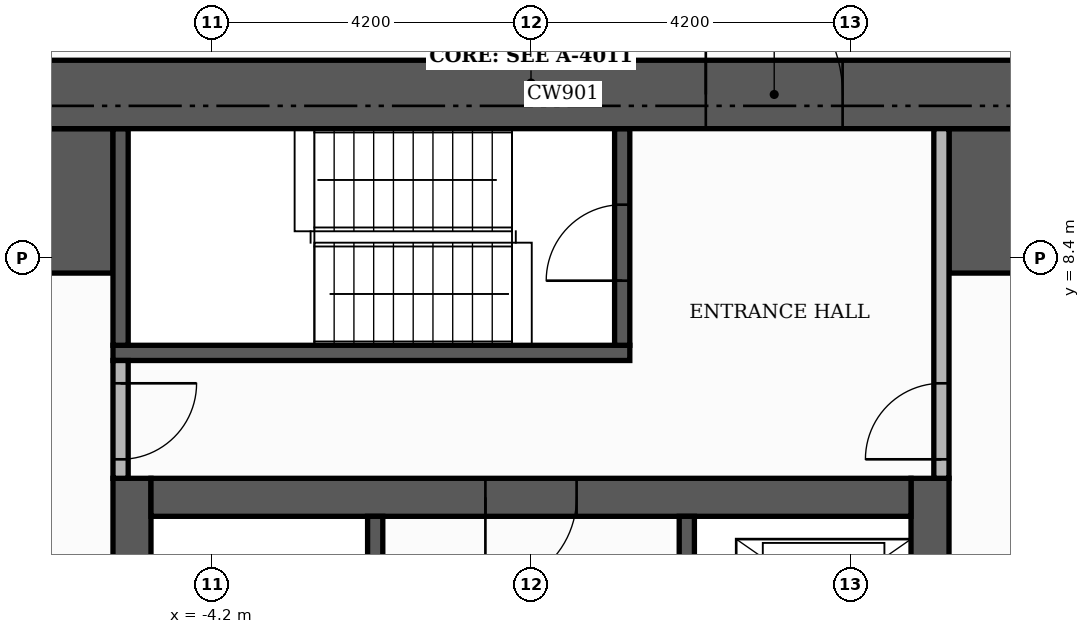
"""IFC4 building model, lengths in metres.
Left out: names, types, materials, properties, quantities, classifications, styles, units other than length and angle.
Written with IfcOpenShell. Run it as: python <this file> out.ifc"""

import sys

from ifc_helpers import new_model, si_unit, direction, frame, frame_2d, origin, place, context, subcontext, project, spatial, rectangle, extrude, element, fill, save


model = new_model("IFC4")
c1 = context("Model", 3, precision=1e-05, world=origin(), true_north=direction((0.0, 1.0)))
c2 = subcontext(c1, "Body", "Model", "MODEL_VIEW")
j1 = project(units=[si_unit("LENGTHUNIT", "METRE"), si_unit("PLANEANGLEUNIT", "RADIAN")], contexts=[c1])
p1 = place(None, origin())
s1 = spatial("IfcSite", under=j1, at=p1, CompositionType="ELEMENT")
p2 = place(p1, origin())
s2 = spatial("IfcBuilding", under=s1, at=p2, CompositionType="ELEMENT")
p3 = place(p2, frame((0.0, 0.0, 69.9)))
s3 = spatial("IfcBuildingStorey", under=s2, at=p3, CompositionType="ELEMENT", Elevation=69.9)
for number, where, z_axis, x_axis in (
    (1, (-5.25, -5.0, 0.0), (0.0, 0.0, 1.0), (0.0, 1.0, 0.0)),
    (2, (5.25, -5.0, 0.0), (0.0, 0.0, 1.0), (0.0, 1.0, 0.0)),
):
    element("IfcWall", number, at=place(p3, frame(where, z_axis=z_axis, x_axis=x_axis)), inside=s3, PredefinedType="SHEAR", context=c2, shape_type="SweptSolid", body=[
        extrude(rectangle(XDim=10.5, YDim=0.5, at=frame_2d((5.25, 0.0))), origin(), (0.0, 0.0, 1.0), 3.4),
    ])
p4 = place(p3, frame((-5.0, 5.25, 0.0), z_axis=(0.0, 0.0, 1.0), x_axis=(1.0, 0.0, 0.0)))
e3 = element("IfcWall", 3, at=p4, inside=s3, PredefinedType="SHEAR", context=c2, shape_type="SweptSolid", body=[
    extrude(rectangle(XDim=10.0, YDim=0.5, at=frame_2d((5.0, 0.0))), origin(), (0.0, 0.0, 1.0), 3.4),
])
p5 = place(p4, frame((4.4, 0.0, 0.0)))
e4 = element("IfcOpeningElement", 4, at=p5, cuts=e3, PredefinedType="OPENING", context=c2, shape_type="SweptSolid", body=[
    extrude(rectangle(XDim=1.2, YDim=2.1, at=frame_2d((0.6, 1.05))), frame((0.0, 0.26, 0.0), z_axis=(0.0, -1.0, 0.0), x_axis=(1.0, 0.0, 0.0)), (0.0, 0.0, 1.0), 0.52),
])
for number, where, z_axis, x_axis in (
    (5, (-10.1, 9.15, 0.0), (0.0, 0.0, 1.0), (1.0, 0.0, 0.0)),
    (6, (5.5, 9.15, 0.0), (0.0, 0.0, 1.0), (1.0, 0.0, 0.0)),
):
    element("IfcWall", number, at=place(p3, frame(where, z_axis=z_axis, x_axis=x_axis)), inside=s3, PredefinedType="SHEAR", context=c2, shape_type="SweptSolid", body=[
        extrude(rectangle(XDim=4.6, YDim=1.9, at=frame_2d((2.3, 0.0))), origin(), (0.0, 0.0, 1.0), 3.4),
    ])
p6 = place(p3, frame((-2.05, -1.4, 0.0), z_axis=(0.0, 0.0, 1.0), x_axis=(0.0, 1.0, 0.0)))
e7 = element("IfcWall", 7, at=p6, inside=s3, PredefinedType="SHEAR", context=c2, shape_type="SweptSolid", body=[
    extrude(rectangle(XDim=6.4, YDim=0.2, at=frame_2d((3.2, 0.0))), origin(), (0.0, 0.0, 1.0), 3.4),
])
p7 = place(p6, frame((0.15, 0.0, 0.0)))
e8 = element("IfcOpeningElement", 8, at=p7, cuts=e7, PredefinedType="OPENING", context=c2, shape_type="SweptSolid", body=[
    extrude(rectangle(XDim=1.0, YDim=2.1, at=frame_2d((0.5, 1.05))), frame((0.0, 0.11, 0.0), z_axis=(0.0, -1.0, 0.0), x_axis=(1.0, 0.0, 0.0)), (0.0, 0.0, 1.0), 0.22),
])
p8 = place(p3, frame((-5.5, 7.15, 0.0), z_axis=(0.0, 0.0, 1.0), x_axis=(1.0, 0.0, 0.0)))
e9 = element("IfcWall", 9, at=p8, inside=s3, PredefinedType="SHEAR", context=c2, shape_type="SweptSolid", body=[
    extrude(rectangle(XDim=6.8, YDim=0.2, at=frame_2d((3.4, 0.0))), origin(), (0.0, 0.0, 1.0), 3.4),
])
p9 = place(p3, frame((-5.4, 7.25, 0.0), z_axis=(0.0, 0.0, 1.0), x_axis=(0.0, 1.0, 0.0)))
e10 = element("IfcWall", 10, at=p9, inside=s3, PredefinedType="SHEAR", context=c2, shape_type="SweptSolid", body=[
    extrude(rectangle(XDim=2.85, YDim=0.2, at=frame_2d((1.425, 0.0))), origin(), (0.0, 0.0, 1.0), 3.4),
])
p10 = place(p3, frame((1.2, 7.25, 0.0), z_axis=(0.0, 0.0, 1.0), x_axis=(0.0, 1.0, 0.0)))
e11 = element("IfcWall", 11, at=p10, inside=s3, PredefinedType="SHEAR", context=c2, shape_type="SweptSolid", body=[
    extrude(rectangle(XDim=2.85, YDim=0.2, at=frame_2d((1.425, 0.0))), origin(), (0.0, 0.0, 1.0), 3.4),
])
p11 = place(p10, frame((0.85, 0.0, 0.0)))
e12 = element("IfcOpeningElement", 12, at=p11, cuts=e11, PredefinedType="OPENING", context=c2, shape_type="SweptSolid", body=[
    extrude(rectangle(XDim=1.0, YDim=2.1, at=frame_2d((0.5, 1.05))), frame((0.0, 0.11, 0.0), z_axis=(0.0, -1.0, 0.0), x_axis=(1.0, 0.0, 0.0)), (0.0, 0.0, 1.0), 0.22),
])
p12 = place(p3, frame((2.05, 1.6, 0.0), z_axis=(0.0, 0.0, 1.0), x_axis=(0.0, 1.0, 0.0)))
e13 = element("IfcWall", 13, at=p12, inside=s3, PredefinedType="SHEAR", context=c2, shape_type="SweptSolid", body=[
    extrude(rectangle(XDim=3.4, YDim=0.2, at=frame_2d((1.7, 0.0))), origin(), (0.0, 0.0, 1.0), 3.4),
])
p13 = place(p12, frame((1.75, 0.0, 0.0)))
e14 = element("IfcOpeningElement", 14, at=p13, cuts=e13, PredefinedType="OPENING", context=c2, shape_type="SweptSolid", body=[
    extrude(rectangle(XDim=1.1, YDim=2.1, at=frame_2d((0.55, 1.05))), frame((0.0, 0.11, 0.0), z_axis=(0.0, -1.0, 0.0), x_axis=(1.0, 0.0, 0.0)), (0.0, 0.0, 1.0), 0.22),
])
p14 = place(p12, frame((0.15, 0.0, 0.0)))
e15 = element("IfcOpeningElement", 15, at=p14, cuts=e13, PredefinedType="OPENING", context=c2, shape_type="SweptSolid", body=[
    extrude(rectangle(XDim=0.8, YDim=2.1, at=frame_2d((0.4, 1.05))), frame((0.0, 0.11, 0.0), z_axis=(0.0, -1.0, 0.0), x_axis=(1.0, 0.0, 0.0)), (0.0, 0.0, 1.0), 0.22),
])
p15 = place(p3, frame((-11.0, 10.55, 0.0), z_axis=(0.0, 0.0, 1.0), x_axis=(1.0, 0.0, 0.0)))
e16 = element("IfcWall", 16, at=p15, inside=s3, PredefinedType="SHEAR", context=c2, shape_type="SweptSolid", body=[
    extrude(rectangle(XDim=22.0, YDim=0.9, at=frame_2d((11.0, 0.0))), origin(), (0.0, 0.0, 1.0), 3.4),
])
p16 = place(p15, frame((13.3, 0.0, 0.0)))
e17 = element("IfcOpeningElement", 17, at=p16, cuts=e16, PredefinedType="OPENING", context=c2, shape_type="SweptSolid", body=[
    extrude(rectangle(XDim=1.8, YDim=2.2, at=frame_2d((0.9, 1.1))), frame((0.0, 0.46, 0.0), z_axis=(0.0, -1.0, 0.0), x_axis=(1.0, 0.0, 0.0)), (0.0, 0.0, 1.0), 0.92),
])
p17 = place(p3, frame((-5.4, 5.5, 0.0), z_axis=(0.0, 0.0, 1.0), x_axis=(0.0, 1.0, 0.0)))
e18 = element("IfcWall", 18, at=p17, inside=s3, PredefinedType="PARTITIONING", context=c2, shape_type="SweptSolid", body=[
    extrude(rectangle(XDim=1.55, YDim=0.2, at=frame_2d((0.775, 0.0))), origin(), (0.0, 0.0, 1.0), 3.4),
])
p18 = place(p17, frame((0.25, 0.0, 0.0)))
e19 = element("IfcOpeningElement", 19, at=p18, cuts=e18, PredefinedType="OPENING", context=c2, shape_type="SweptSolid", body=[
    extrude(rectangle(XDim=1.0, YDim=2.1, at=frame_2d((0.5, 1.05))), frame((0.0, 0.11, 0.0), z_axis=(0.0, -1.0, 0.0), x_axis=(1.0, 0.0, 0.0)), (0.0, 0.0, 1.0), 0.22),
])
p19 = place(p3, frame((5.4, 5.5, 0.0), z_axis=(0.0, 0.0, 1.0), x_axis=(0.0, 1.0, 0.0)))
e20 = element("IfcWall", 20, at=p19, inside=s3, PredefinedType="PARTITIONING", context=c2, shape_type="SweptSolid", body=[
    extrude(rectangle(XDim=4.6, YDim=0.2, at=frame_2d((2.3, 0.0))), origin(), (0.0, 0.0, 1.0), 3.4),
])
p20 = place(p19, frame((0.25, 0.0, 0.0)))
e21 = element("IfcOpeningElement", 21, at=p20, cuts=e20, PredefinedType="OPENING", context=c2, shape_type="SweptSolid", body=[
    extrude(rectangle(XDim=1.0, YDim=2.1, at=frame_2d((0.5, 1.05))), frame((0.0, 0.11, 0.0), z_axis=(0.0, -1.0, 0.0), x_axis=(1.0, 0.0, 0.0)), (0.0, 0.0, 1.0), 0.22),
])
p21 = place(p5, frame((1.2, 0.0, 0.0), z_axis=(0.0, 0.0, 1.0), x_axis=(-1.0, 0.0, 0.0)))
e22 = element("IfcDoor", 22, at=p21, inside=s3, OperationType="SINGLE_SWING_LEFT", PredefinedType="DOOR", context=c2, shape_type="SweptSolid", body=[
    extrude(rectangle(XDim=1.2, YDim=2.1, at=frame_2d((0.6, 1.05))), frame((0.0, 0.025, 0.0), z_axis=(0.0, -1.0, 0.0), x_axis=(1.0, 0.0, 0.0)), (0.0, 0.0, 1.0), 0.05),
])
fill(e4, e22)
p22 = place(p11, origin())
e23 = element("IfcDoor", 23, at=p22, inside=s3, OperationType="SINGLE_SWING_LEFT", PredefinedType="DOOR", context=c2, shape_type="SweptSolid", body=[
    extrude(rectangle(XDim=1.0, YDim=2.1, at=frame_2d((0.5, 1.05))), frame((0.0, 0.025, 0.0), z_axis=(0.0, -1.0, 0.0), x_axis=(1.0, 0.0, 0.0)), (0.0, 0.0, 1.0), 0.05),
])
fill(e12, e23)
p23 = place(p18, frame((1.0, 0.0, 0.0), z_axis=(0.0, 0.0, 1.0), x_axis=(-1.0, 0.0, 0.0)))
e24 = element("IfcDoor", 24, at=p23, inside=s3, OperationType="SINGLE_SWING_RIGHT", PredefinedType="DOOR", context=c2, shape_type="SweptSolid", body=[
    extrude(rectangle(XDim=1.0, YDim=2.1, at=frame_2d((0.5, 1.05))), frame((0.0, 0.025, 0.0), z_axis=(0.0, -1.0, 0.0), x_axis=(1.0, 0.0, 0.0)), (0.0, 0.0, 1.0), 0.05),
])
fill(e19, e24)
p24 = place(p20, origin())
e25 = element("IfcDoor", 25, at=p24, inside=s3, OperationType="SINGLE_SWING_LEFT", PredefinedType="DOOR", context=c2, shape_type="SweptSolid", body=[
    extrude(rectangle(XDim=1.0, YDim=2.1, at=frame_2d((0.5, 1.05))), frame((0.0, 0.025, 0.0), z_axis=(0.0, -1.0, 0.0), x_axis=(1.0, 0.0, 0.0)), (0.0, 0.0, 1.0), 0.05),
])
fill(e21, e25)
p25 = place(p16, origin())
e26 = element("IfcDoor", 26, at=p25, inside=s3, OperationType="DOUBLE_DOOR_SINGLE_SWING", PredefinedType="DOOR", context=c2, shape_type="SweptSolid", body=[
    extrude(rectangle(XDim=1.8, YDim=2.2, at=frame_2d((0.9, 1.1))), frame((0.0, 0.025, 0.0), z_axis=(0.0, -1.0, 0.0), x_axis=(1.0, 0.0, 0.0)), (0.0, 0.0, 1.0), 0.05),
])
fill(e17, e26)
save(model, sys.argv[1])
